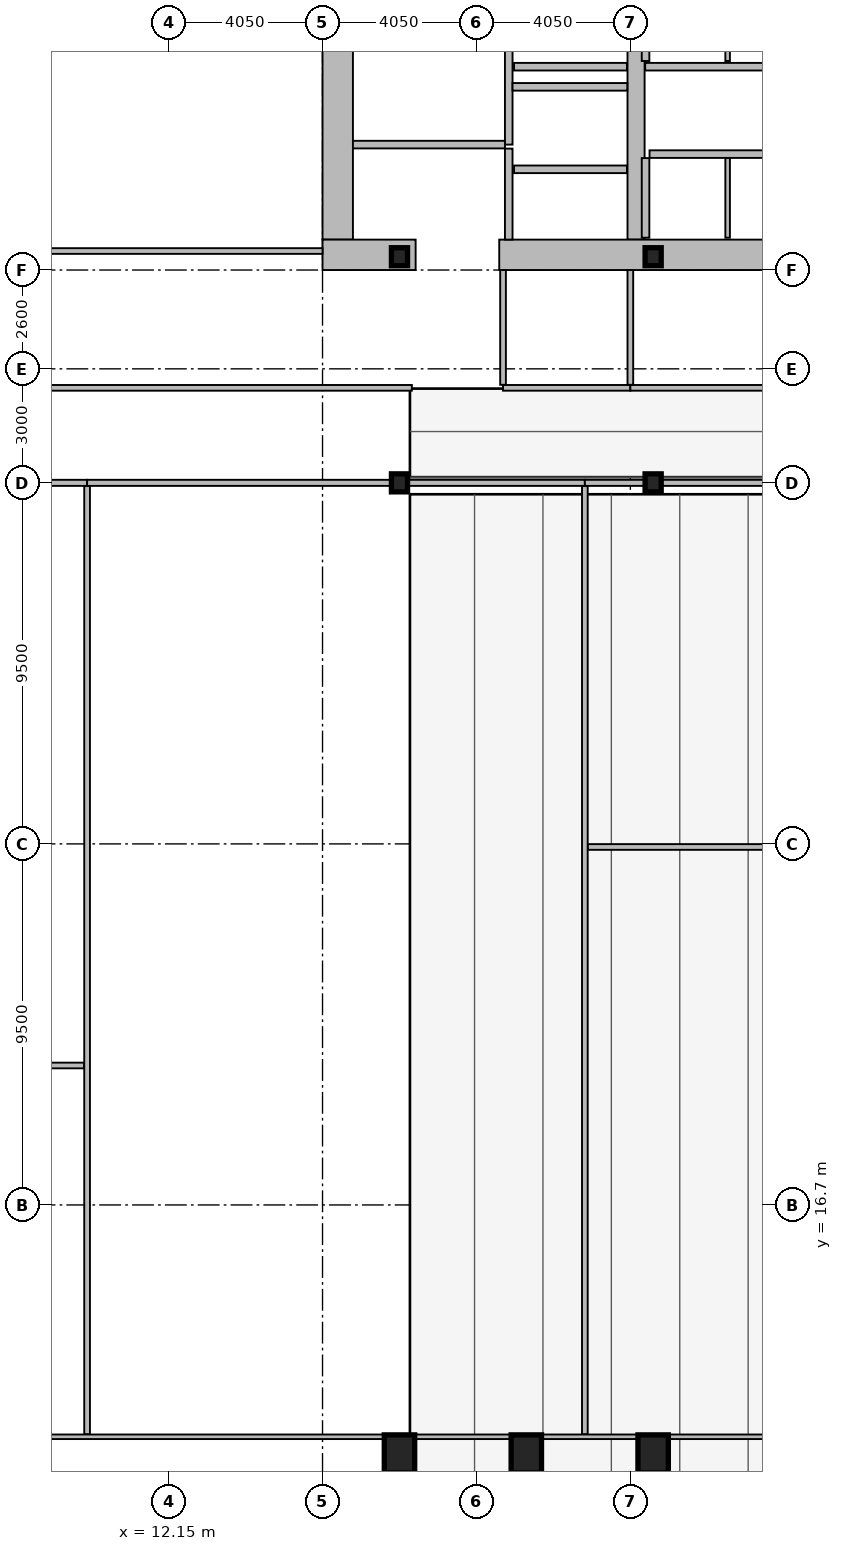
"""IFC4 building model, lengths in metres.
Left out: names, types, materials, properties, quantities, classifications, styles, units other than length and angle.
Written with IfcOpenShell. Run it as: python <this file> out.ifc"""

import sys

from ifc_helpers import new_model, si_unit, direction, frame, frame_2d, origin, origin_2d, place, context, subcontext, project, spatial, rectangle, hollow_rectangle, i_section, extrude, element, fill, save


model = new_model("IFC4")
c1 = context("Model", 3, precision=1e-05, world=origin(), true_north=direction((0.0, 1.0)))
c2 = subcontext(c1, "Body", "Model", "MODEL_VIEW")
j1 = project(units=[si_unit("LENGTHUNIT", "METRE"), si_unit("PLANEANGLEUNIT", "RADIAN")], contexts=[c1])
p1 = place(None, origin())
s1 = spatial("IfcSite", under=j1, at=p1, CompositionType="ELEMENT")
p2 = place(p1, origin())
s2 = spatial("IfcBuilding", under=s1, at=p2, CompositionType="ELEMENT")
p3 = place(p2, frame((0.0, 0.0, 25.8)))
s3 = spatial("IfcBuildingStorey", under=s2, at=p3, CompositionType="ELEMENT", Elevation=25.8)
p4 = place(p3, frame((16.6, 42.1, 0.0), z_axis=(0.0, 0.0, 1.0), x_axis=(0.0, 1.0, 0.0)))
e1 = element("IfcWall", 1, at=p4, inside=s3, PredefinedType="SHEAR", context=c2, shape_type="SweptSolid", body=[
    extrude(rectangle(XDim=10.8, YDim=0.8, at=frame_2d((5.4, 0.0))), origin(), (0.0, 0.0, 1.0), 3.82),
])
p5 = place(p3, frame((24.45, 42.1, 0.0), z_axis=(0.0, 0.0, 1.0), x_axis=(0.0, 1.0, 0.0)))
e2 = element("IfcWall", 2, at=p5, inside=s3, PredefinedType="SHEAR", context=c2, shape_type="SweptSolid", body=[
    extrude(rectangle(XDim=10.8, YDim=0.45, at=frame_2d((5.4, 0.0))), origin(), (0.0, 0.0, 1.0), 3.82),
])
p6 = place(p3, frame((18.65, 41.7, 0.0), z_axis=(0.0, 0.0, 1.0), x_axis=(-1.0, 0.0, 0.0)))
e3 = element("IfcWall", 3, at=p6, inside=s3, PredefinedType="SHEAR", context=c2, shape_type="SweptSolid", body=[
    extrude(rectangle(XDim=2.45, YDim=0.8, at=frame_2d((1.225, 0.0))), origin(), (0.0, 0.0, 1.0), 3.82),
])
p7 = place(p3, frame((32.3, 41.7, 0.0), z_axis=(0.0, 0.0, 1.0), x_axis=(-1.0, 0.0, 0.0)))
e4 = element("IfcWall", 4, at=p7, inside=s3, PredefinedType="SHEAR", context=c2, shape_type="SweptSolid", body=[
    extrude(rectangle(XDim=11.45, YDim=0.8, at=frame_2d((5.725, 0.0))), origin(), (0.0, 0.0, 1.0), 3.82),
])
for number, where, z_axis, x_axis in (
    (5, (18.225, 10.15, 0.0), (0.0, 0.0, 1.0), (1.0, 0.0, 0.0)),
    (6, (21.562, 10.15, 0.0), (0.0, 0.0, 1.0), (1.0, 0.0, 0.0)),
    (7, (24.9, 10.15, 0.0), (0.0, 0.0, 1.0), (1.0, 0.0, 0.0)),
):
    element("IfcColumn", number, at=place(p3, frame(where, z_axis=z_axis, x_axis=x_axis)), inside=s3, PredefinedType="COLUMN", context=c2, shape_type="SweptSolid", body=[
        extrude(hollow_rectangle(XDim=0.8, YDim=1.0, WallThickness=0.055, at=origin_2d()), origin(), (0.0, 0.0, 1.0), 4.0),
    ])
for number, where, z_axis, x_axis in (
    (8, (18.225, 35.7, 0.0), (0.0, 0.0, 1.0), (1.0, 0.0, 0.0)),
    (9, (18.225, 41.65, 0.0), (0.0, 0.0, 1.0), (1.0, 0.0, 0.0)),
    (10, (24.9, 35.7, 0.0), (0.0, 0.0, 1.0), (1.0, 0.0, 0.0)),
    (11, (24.9, 41.65, 0.0), (0.0, 0.0, 1.0), (1.0, 0.0, 0.0)),
):
    element("IfcColumn", number, at=place(p3, frame(where, z_axis=z_axis, x_axis=x_axis)), inside=s3, PredefinedType="COLUMN", context=c2, shape_type="SweptSolid", body=[
        extrude(i_section(OverallWidth=0.424, OverallDepth=0.474, WebThickness=0.048, FlangeThickness=0.077, at=origin_2d()), origin(), (0.0, 0.0, 1.0), 4.0),
    ])
p8 = place(p3, frame((24.21, 43.95, 0.0), z_axis=(0.0, 0.0, 1.0), x_axis=(-1.0, 0.0, 0.0)))
e12 = element("IfcWall", 12, at=p8, inside=s3, PredefinedType="PARTITIONING", context=c2, shape_type="SweptSolid", body=[
    extrude(rectangle(XDim=2.97, YDim=0.2, at=frame_2d((1.485, 0.0))), origin(), (0.0, 0.0, 1.0), 3.82),
])
p9 = place(p8, frame((0.86, 0.0, 0.0)))
e13 = element("IfcOpeningElement", 13, at=p9, cuts=e12, PredefinedType="OPENING", context=c2, shape_type="SweptSolid", body=[
    extrude(rectangle(XDim=1.3, YDim=2.18, at=frame_2d((0.65, 1.09))), frame((0.0, 0.11, 0.0), z_axis=(0.0, -1.0, 0.0), x_axis=(1.0, 0.0, 0.0)), (0.0, 0.0, 1.0), 0.22),
])
p10 = place(p3, frame((24.21, 46.65, 0.0), z_axis=(0.0, 0.0, 1.0), x_axis=(-1.0, 0.0, 0.0)))
e14 = element("IfcWall", 14, at=p10, inside=s3, PredefinedType="PARTITIONING", context=c2, shape_type="SweptSolid", body=[
    extrude(rectangle(XDim=2.97, YDim=0.2, at=frame_2d((1.485, 0.0))), origin(), (0.0, 0.0, 1.0), 3.82),
])
p11 = place(p10, frame((0.91, 0.0, 0.0)))
e15 = element("IfcOpeningElement", 15, at=p11, cuts=e14, PredefinedType="OPENING", context=c2, shape_type="SweptSolid", body=[
    extrude(rectangle(XDim=1.2, YDim=2.18, at=frame_2d((0.6, 1.09))), frame((0.0, 0.11, 0.0), z_axis=(0.0, -1.0, 0.0), x_axis=(1.0, 0.0, 0.0)), (0.0, 0.0, 1.0), 0.22),
])
p12 = place(p3, frame((31.22, 46.65, 0.0), z_axis=(0.0, 0.0, 1.0), x_axis=(-1.0, 0.0, 0.0)))
e16 = element("IfcWall", 16, at=p12, inside=s3, PredefinedType="PARTITIONING", context=c2, shape_type="SweptSolid", body=[
    extrude(rectangle(XDim=6.53, YDim=0.2, at=frame_2d((3.265, 0.0))), origin(), (0.0, 0.0, 1.0), 3.82),
])
p13 = place(p12, frame((4.9, 0.0, 0.0)))
e17 = element("IfcOpeningElement", 17, at=p13, cuts=e16, PredefinedType="OPENING", context=c2, shape_type="SweptSolid", body=[
    extrude(rectangle(XDim=1.1, YDim=2.18, at=frame_2d((0.55, 1.09))), frame((0.0, 0.11, 0.0), z_axis=(0.0, -1.0, 0.0), x_axis=(1.0, 0.0, 0.0)), (0.0, 0.0, 1.0), 0.22),
])
p14 = place(p12, frame((2.74, 0.0, 0.0)))
e18 = element("IfcOpeningElement", 18, at=p14, cuts=e16, PredefinedType="OPENING", context=c2, shape_type="SweptSolid", body=[
    extrude(rectangle(XDim=1.1, YDim=2.18, at=frame_2d((0.55, 1.09))), frame((0.0, 0.11, 0.0), z_axis=(0.0, -1.0, 0.0), x_axis=(1.0, 0.0, 0.0)), (0.0, 0.0, 1.0), 0.22),
])
p15 = place(p12, frame((0.58, 0.0, 0.0)))
e19 = element("IfcOpeningElement", 19, at=p15, cuts=e16, PredefinedType="OPENING", context=c2, shape_type="SweptSolid", body=[
    extrude(rectangle(XDim=1.1, YDim=2.18, at=frame_2d((0.55, 1.09))), frame((0.0, 0.11, 0.0), z_axis=(0.0, -1.0, 0.0), x_axis=(1.0, 0.0, 0.0)), (0.0, 0.0, 1.0), 0.22),
])
p16 = place(p3, frame((21.1, 44.6, 0.0), z_axis=(0.0, 0.0, 1.0), x_axis=(0.0, 1.0, 0.0)))
e20 = element("IfcWall", 20, at=p16, inside=s3, PredefinedType="PARTITIONING", context=c2, shape_type="SweptSolid", body=[
    extrude(rectangle(XDim=4.3, YDim=0.2, at=frame_2d((2.15, 0.0))), origin(), (0.0, 0.0, 1.0), 3.82),
])
p17 = place(p3, frame((17.0, 44.6, 0.0), z_axis=(0.0, 0.0, 1.0), x_axis=(1.0, 0.0, 0.0)))
e21 = element("IfcWall", 21, at=p17, inside=s3, PredefinedType="PARTITIONING", context=c2, shape_type="SweptSolid", body=[
    extrude(rectangle(XDim=4.0, YDim=0.2, at=frame_2d((2.0, 0.0))), origin(), (0.0, 0.0, 1.0), 3.82),
])
p18 = place(p17, frame((1.25, 0.0, 0.0)))
e22 = element("IfcOpeningElement", 22, at=p18, cuts=e21, PredefinedType="OPENING", context=c2, shape_type="SweptSolid", body=[
    extrude(rectangle(XDim=1.05, YDim=2.15, at=frame_2d((0.525, 1.075))), frame((0.0, 0.11, 0.0), z_axis=(0.0, -1.0, 0.0), x_axis=(1.0, 0.0, 0.0)), (0.0, 0.0, 1.0), 0.22),
])
p19 = place(p3, frame((21.2, 46.12, 0.0), z_axis=(0.0, 0.0, 1.0), x_axis=(1.0, 0.0, 0.0)))
e23 = element("IfcWall", 23, at=p19, inside=s3, PredefinedType="PARTITIONING", context=c2, shape_type="SweptSolid", body=[
    extrude(rectangle(XDim=3.02, YDim=0.2, at=frame_2d((1.51, 0.0))), origin(), (0.0, 0.0, 1.0), 3.82),
])
p20 = place(p3, frame((21.1, 42.1, 0.0), z_axis=(0.0, 0.0, 1.0), x_axis=(0.0, 1.0, 0.0)))
e24 = element("IfcWall", 24, at=p20, inside=s3, PredefinedType="PARTITIONING", context=c2, shape_type="SweptSolid", body=[
    extrude(rectangle(XDim=2.395, YDim=0.2, at=frame_2d((1.198, 0.0))), origin(), (0.0, 0.0, 1.0), 3.82),
])
p21 = place(p20, frame((0.38, 0.0, 0.0)))
e25 = element("IfcOpeningElement", 25, at=p21, cuts=e24, PredefinedType="OPENING", context=c2, shape_type="SweptSolid", body=[
    extrude(rectangle(XDim=1.05, YDim=2.15, at=frame_2d((0.525, 1.075))), frame((0.0, 0.11, 0.0), z_axis=(0.0, -1.0, 0.0), x_axis=(1.0, 0.0, 0.0)), (0.0, 0.0, 1.0), 0.22),
])
p22 = place(p3, frame((24.7, 46.8, 0.0), z_axis=(0.0, 0.0, 1.0), x_axis=(0.0, 1.0, 0.0)))
e26 = element("IfcWall", 26, at=p22, inside=s3, PredefinedType="PARTITIONING", context=c2, shape_type="SweptSolid", body=[
    extrude(rectangle(XDim=2.095, YDim=0.2, at=frame_2d((1.047, 0.0))), origin(), (0.0, 0.0, 1.0), 3.82),
])
p23 = place(p3, frame((26.86, 46.8, 0.0), z_axis=(0.0, 0.0, 1.0), x_axis=(0.0, 1.0, 0.0)))
e27 = element("IfcWall", 27, at=p23, inside=s3, PredefinedType="PARTITIONING", context=c2, shape_type="SweptSolid", body=[
    extrude(rectangle(XDim=2.095, YDim=0.12, at=frame_2d((1.047, 0.0))), origin(), (0.0, 0.0, 1.0), 3.82),
])
p24 = place(p3, frame((24.805, 44.35, 0.0), z_axis=(0.0, 0.0, 1.0), x_axis=(1.0, 0.0, 0.0)))
e28 = element("IfcWall", 28, at=p24, inside=s3, PredefinedType="PARTITIONING", context=c2, shape_type="SweptSolid", body=[
    extrude(rectangle(XDim=6.27, YDim=0.2, at=frame_2d((3.135, 0.0))), origin(), (0.0, 0.0, 1.0), 3.82),
])
p25 = place(p3, frame((24.7, 42.15, 0.0), z_axis=(0.0, 0.0, 1.0), x_axis=(0.0, 1.0, 0.0)))
e29 = element("IfcWall", 29, at=p25, inside=s3, PredefinedType="PARTITIONING", context=c2, shape_type="SweptSolid", body=[
    extrude(rectangle(XDim=2.095, YDim=0.2, at=frame_2d((1.048, 0.0))), origin(), (0.0, 0.0, 1.0), 3.82),
])
p26 = place(p3, frame((26.86, 42.15, 0.0), z_axis=(0.0, 0.0, 1.0), x_axis=(0.0, 1.0, 0.0)))
e30 = element("IfcWall", 30, at=p26, inside=s3, PredefinedType="PARTITIONING", context=c2, shape_type="SweptSolid", body=[
    extrude(rectangle(XDim=2.095, YDim=0.12, at=frame_2d((1.048, 0.0))), origin(), (0.0, 0.0, 1.0), 3.82),
])
p27 = place(p3, frame((20.95, 38.2, 0.0), z_axis=(0.0, 0.0, 1.0), x_axis=(1.0, 0.0, 0.0)))
e31 = element("IfcWall", 31, at=p27, inside=s3, PredefinedType="PARTITIONING", context=c2, shape_type="SweptSolid", body=[
    extrude(rectangle(XDim=3.35, YDim=0.15, at=frame_2d((1.675, 0.0))), origin(), (0.0, 0.0, 1.0), 3.82),
])
p28 = place(p27, frame((0.9, 0.0, 0.0)))
e32 = element("IfcOpeningElement", 32, at=p28, cuts=e31, PredefinedType="OPENING", context=c2, shape_type="SweptSolid", body=[
    extrude(rectangle(XDim=0.95, YDim=2.05, at=frame_2d((0.475, 1.025))), frame((0.0, 0.085, 0.0), z_axis=(0.0, -1.0, 0.0), x_axis=(1.0, 0.0, 0.0)), (0.0, 0.0, 1.0), 0.17),
])
p29 = place(p3, frame((24.3, 38.2, 0.0), z_axis=(0.0, 0.0, 1.0), x_axis=(1.0, 0.0, 0.0)))
e33 = element("IfcWall", 33, at=p29, inside=s3, PredefinedType="PARTITIONING", context=c2, shape_type="SweptSolid", body=[
    extrude(rectangle(XDim=4.1, YDim=0.15, at=frame_2d((2.05, 0.0))), origin(), (0.0, 0.0, 1.0), 3.01),
])
p30 = place(p29, frame((0.9, 0.0, 0.0)))
e34 = element("IfcOpeningElement", 34, at=p30, cuts=e33, PredefinedType="OPENING", context=c2, shape_type="SweptSolid", body=[
    extrude(rectangle(XDim=0.95, YDim=2.05, at=frame_2d((0.475, 1.025))), frame((0.0, 0.085, 0.0), z_axis=(0.0, -1.0, 0.0), x_axis=(1.0, 0.0, 0.0)), (0.0, 0.0, 1.0), 0.17),
])
for number, where, z_axis, x_axis in (
    (35, (20.95, 38.28, 0.0), (0.0, 0.0, 1.0), (0.0, 1.0, 0.0)),
    (36, (24.3, 38.28, 0.0), (0.0, 0.0, 1.0), (0.0, 1.0, 0.0)),
):
    element("IfcWall", number, at=place(p3, frame(where, z_axis=z_axis, x_axis=x_axis)), inside=s3, PredefinedType="PARTITIONING", context=c2, shape_type="SweptSolid", body=[
        extrude(rectangle(XDim=3.02, YDim=0.15, at=frame_2d((1.51, 0.0))), origin(), (0.0, 0.0, 1.0), 3.82),
    ])
p31 = place(p3, frame((2.03, 38.2, 0.0), z_axis=(0.0, 0.0, 1.0), x_axis=(1.0, 0.0, 0.0)))
e37 = element("IfcWall", 37, at=p31, inside=s3, PredefinedType="PARTITIONING", context=c2, shape_type="SweptSolid", body=[
    extrude(rectangle(XDim=16.52, YDim=0.15, at=frame_2d((8.26, 0.0))), origin(), (0.0, 0.0, 1.0), 3.01),
])
p32 = place(p31, frame((12.32, 0.0, 0.0)))
e38 = element("IfcOpeningElement", 38, at=p32, cuts=e37, PredefinedType="OPENING", context=c2, shape_type="SweptSolid", body=[
    extrude(rectangle(XDim=0.95, YDim=2.05, at=frame_2d((0.475, 1.025))), frame((0.0, 0.085, 0.0), z_axis=(0.0, -1.0, 0.0), x_axis=(1.0, 0.0, 0.0)), (0.0, 0.0, 1.0), 0.17),
])
p33 = place(p3, frame((2.095, 41.8, 0.0), z_axis=(0.0, 0.0, 1.0), x_axis=(1.0, 0.0, 0.0)))
e39 = element("IfcWall", 39, at=p33, inside=s3, PredefinedType="PARTITIONING", context=c2, shape_type="SweptSolid", body=[
    extrude(rectangle(XDim=14.105, YDim=0.15, at=frame_2d((7.052, 0.0))), origin(), (0.0, 0.0, 1.0), 3.82),
])
p34 = place(p33, frame((12.32, 0.0, 0.0)))
e40 = element("IfcOpeningElement", 40, at=p34, cuts=e39, PredefinedType="OPENING", context=c2, shape_type="SweptSolid", body=[
    extrude(rectangle(XDim=0.9, YDim=2.05, at=frame_2d((0.45, 1.025))), frame((0.0, 0.085, 0.0), z_axis=(0.0, -1.0, 0.0), x_axis=(1.0, 0.0, 0.0)), (0.0, 0.0, 1.0), 0.17),
])
p35 = place(p3, frame((2.03, 35.7, 0.0), z_axis=(0.0, 0.0, 1.0), x_axis=(1.0, 0.0, 0.0)))
e41 = element("IfcWall", 41, at=p35, inside=s3, PredefinedType="PARTITIONING", context=c2, shape_type="SweptSolid", body=[
    extrude(rectangle(XDim=7.975, YDim=0.16, at=frame_2d((3.987, 0.0))), origin(), (0.0, 0.0, 1.0), 3.01),
])
p36 = place(p35, frame((3.35, 0.0, 0.0)))
e42 = element("IfcOpeningElement", 42, at=p36, cuts=e41, PredefinedType="OPENING", context=c2, shape_type="SweptSolid", body=[
    extrude(rectangle(XDim=1.0, YDim=2.05, at=frame_2d((0.5, 1.025))), frame((0.0, 0.09, 0.0), z_axis=(0.0, -1.0, 0.0), x_axis=(1.0, 0.0, 0.0)), (0.0, 0.0, 1.0), 0.18),
])
p37 = place(p3, frame((2.095, 20.369, 0.0), z_axis=(0.0, 0.0, 1.0), x_axis=(1.0, 0.0, 0.0)))
e43 = element("IfcWall", 43, at=p37, inside=s3, PredefinedType="PARTITIONING", context=c2, shape_type="SweptSolid", body=[
    extrude(rectangle(XDim=7.83, YDim=0.15, at=frame_2d((3.915, 0.0))), origin(), (0.0, 0.0, 1.0), 3.82),
])
p38 = place(p37, frame((3.589, 0.0, 0.0)))
e44 = element("IfcOpeningElement", 44, at=p38, cuts=e43, PredefinedType="OPENING", context=c2, shape_type="SweptSolid", body=[
    extrude(rectangle(XDim=0.9, YDim=2.05, at=frame_2d((0.45, 1.025))), frame((0.0, 0.085, 0.0), z_axis=(0.0, -1.0, 0.0), x_axis=(1.0, 0.0, 0.0)), (0.0, 0.0, 1.0), 0.17),
])
p39 = place(p3, frame((10.005, 35.7, 0.0), z_axis=(0.0, 0.0, 1.0), x_axis=(1.0, 0.0, 0.0)))
e45 = element("IfcWall", 45, at=p39, inside=s3, PredefinedType="PARTITIONING", context=c2, shape_type="SweptSolid", body=[
    extrude(rectangle(XDim=13.098, YDim=0.16, at=frame_2d((6.549, 0.0))), origin(), (0.0, 0.0, 1.0), 3.01),
])
p40 = place(p39, frame((5.501, 0.0, 0.0)))
e46 = element("IfcOpeningElement", 46, at=p40, cuts=e45, PredefinedType="OPENING", context=c2, shape_type="SweptSolid", body=[
    extrude(rectangle(XDim=1.0, YDim=2.05, at=frame_2d((0.5, 1.025))), frame((0.0, 0.09, 0.0), z_axis=(0.0, -1.0, 0.0), x_axis=(1.0, 0.0, 0.0)), (0.0, 0.0, 1.0), 0.18),
])
p41 = place(p3, frame((10.005, 10.665, 0.0), z_axis=(0.0, 0.0, 1.0), x_axis=(0.0, 1.0, 0.0)))
e47 = element("IfcWall", 47, at=p41, inside=s3, PredefinedType="PARTITIONING", context=c2, shape_type="SweptSolid", body=[
    extrude(rectangle(XDim=24.95, YDim=0.15, at=frame_2d((12.475, 0.0))), origin(), (0.0, 0.0, 1.0), 3.01),
])
p42 = place(p3, frame((23.103, 35.7, 0.0), z_axis=(0.0, 0.0, 1.0), x_axis=(1.0, 0.0, 0.0)))
e48 = element("IfcWall", 48, at=p42, inside=s3, PredefinedType="PARTITIONING", context=c2, shape_type="SweptSolid", body=[
    extrude(rectangle(XDim=19.384, YDim=0.16, at=frame_2d((9.692, 0.0))), origin(), (0.0, 0.0, 1.0), 3.01),
])
p43 = place(p42, frame((8.141, 0.0, 0.0)))
e49 = element("IfcOpeningElement", 49, at=p43, cuts=e48, PredefinedType="OPENING", context=c2, shape_type="SweptSolid", body=[
    extrude(rectangle(XDim=1.6, YDim=2.15, at=frame_2d((0.8, 1.075))), frame((0.0, 0.09, 0.0), z_axis=(0.0, -1.0, 0.0), x_axis=(1.0, 0.0, 0.0)), (0.0, 0.0, 1.0), 0.18),
])
p44 = place(p3, frame((23.103, 10.665, 0.0), z_axis=(0.0, 0.0, 1.0), x_axis=(0.0, 1.0, 0.0)))
e50 = element("IfcWall", 50, at=p44, inside=s3, PredefinedType="PARTITIONING", context=c2, shape_type="SweptSolid", body=[
    extrude(rectangle(XDim=24.95, YDim=0.15, at=frame_2d((12.475, 0.0))), origin(), (0.0, 0.0, 1.0), 3.21),
])
p45 = place(p3, frame((23.183, 26.119, 0.0), z_axis=(0.0, 0.0, 1.0), x_axis=(1.0, 0.0, 0.0)))
e51 = element("IfcWall", 51, at=p45, inside=s3, PredefinedType="PARTITIONING", context=c2, shape_type="SweptSolid", body=[
    extrude(rectangle(XDim=19.224, YDim=0.15, at=frame_2d((9.612, 0.0))), origin(), (0.0, 0.0, 1.0), 3.01),
])
p46 = place(p45, frame((8.723, 0.0, 0.0)))
e52 = element("IfcOpeningElement", 52, at=p46, cuts=e51, PredefinedType="OPENING", context=c2, shape_type="SweptSolid", body=[
    extrude(rectangle(XDim=0.9, YDim=2.05, at=frame_2d((0.45, 1.025))), frame((0.0, 0.085, 0.0), z_axis=(0.0, -1.0, 0.0), x_axis=(1.0, 0.0, 0.0)), (0.0, 0.0, 1.0), 0.17),
])
p47 = place(p3, frame((2.095, 10.6, 0.0), z_axis=(0.0, 0.0, 1.0), x_axis=(1.0, 0.0, 0.0)))
e53 = element("IfcWall", 53, at=p47, inside=s3, PredefinedType="PARTITIONING", context=c2, shape_type="SweptSolid", body=[
    extrude(rectangle(XDim=68.71, YDim=0.12, at=frame_2d((34.355, 0.0))), origin(), (0.0, 0.0, 1.0), 3.01),
])
p48 = place(p9, origin())
e54 = element("IfcDoor", 54, at=p48, inside=s3, OperationType="SLIDING_TO_LEFT", PredefinedType="DOOR", context=c2, shape_type="SweptSolid", body=[
    extrude(rectangle(XDim=1.3, YDim=2.18, at=frame_2d((0.65, 1.09))), frame((0.0, 0.025, 0.0), z_axis=(0.0, -1.0, 0.0), x_axis=(1.0, 0.0, 0.0)), (0.0, 0.0, 1.0), 0.05),
])
fill(e13, e54)
p49 = place(p11, origin())
e55 = element("IfcDoor", 55, at=p49, inside=s3, OperationType="SLIDING_TO_LEFT", PredefinedType="DOOR", context=c2, shape_type="SweptSolid", body=[
    extrude(rectangle(XDim=1.2, YDim=2.18, at=frame_2d((0.6, 1.09))), frame((0.0, 0.025, 0.0), z_axis=(0.0, -1.0, 0.0), x_axis=(1.0, 0.0, 0.0)), (0.0, 0.0, 1.0), 0.05),
])
fill(e15, e55)
p50 = place(p13, origin())
e56 = element("IfcDoor", 56, at=p50, inside=s3, OperationType="SLIDING_TO_LEFT", PredefinedType="DOOR", context=c2, shape_type="SweptSolid", body=[
    extrude(rectangle(XDim=1.1, YDim=2.18, at=frame_2d((0.55, 1.09))), frame((0.0, 0.025, 0.0), z_axis=(0.0, -1.0, 0.0), x_axis=(1.0, 0.0, 0.0)), (0.0, 0.0, 1.0), 0.05),
])
fill(e17, e56)
p51 = place(p14, origin())
e57 = element("IfcDoor", 57, at=p51, inside=s3, OperationType="SLIDING_TO_LEFT", PredefinedType="DOOR", context=c2, shape_type="SweptSolid", body=[
    extrude(rectangle(XDim=1.1, YDim=2.18, at=frame_2d((0.55, 1.09))), frame((0.0, 0.025, 0.0), z_axis=(0.0, -1.0, 0.0), x_axis=(1.0, 0.0, 0.0)), (0.0, 0.0, 1.0), 0.05),
])
fill(e18, e57)
p52 = place(p18, origin())
e58 = element("IfcDoor", 58, at=p52, inside=s3, OperationType="SINGLE_SWING_RIGHT", PredefinedType="DOOR", context=c2, shape_type="SweptSolid", body=[
    extrude(rectangle(XDim=1.05, YDim=2.15, at=frame_2d((0.525, 1.075))), frame((0.0, 0.025, 0.0), z_axis=(0.0, -1.0, 0.0), x_axis=(1.0, 0.0, 0.0)), (0.0, 0.0, 1.0), 0.05),
])
fill(e22, e58)
p53 = place(p21, origin())
e59 = element("IfcDoor", 59, at=p53, inside=s3, OperationType="SINGLE_SWING_LEFT", PredefinedType="DOOR", context=c2, shape_type="SweptSolid", body=[
    extrude(rectangle(XDim=1.05, YDim=2.15, at=frame_2d((0.525, 1.075))), frame((0.0, 0.025, 0.0), z_axis=(0.0, -1.0, 0.0), x_axis=(1.0, 0.0, 0.0)), (0.0, 0.0, 1.0), 0.05),
])
fill(e25, e59)
p54 = place(p28, origin())
e60 = element("IfcDoor", 60, at=p54, inside=s3, OperationType="SINGLE_SWING_LEFT", PredefinedType="DOOR", context=c2, shape_type="SweptSolid", body=[
    extrude(rectangle(XDim=0.95, YDim=2.05, at=frame_2d((0.475, 1.025))), frame((0.0, 0.025, 0.0), z_axis=(0.0, -1.0, 0.0), x_axis=(1.0, 0.0, 0.0)), (0.0, 0.0, 1.0), 0.05),
])
fill(e32, e60)
p55 = place(p30, origin())
e61 = element("IfcDoor", 61, at=p55, inside=s3, OperationType="SINGLE_SWING_RIGHT", PredefinedType="DOOR", context=c2, shape_type="SweptSolid", body=[
    extrude(rectangle(XDim=0.95, YDim=2.05, at=frame_2d((0.475, 1.025))), frame((0.0, 0.025, 0.0), z_axis=(0.0, -1.0, 0.0), x_axis=(1.0, 0.0, 0.0)), (0.0, 0.0, 1.0), 0.05),
])
fill(e34, e61)
p56 = place(p32, origin())
e62 = element("IfcDoor", 62, at=p56, inside=s3, OperationType="SINGLE_SWING_RIGHT", PredefinedType="DOOR", context=c2, shape_type="SweptSolid", body=[
    extrude(rectangle(XDim=0.95, YDim=2.05, at=frame_2d((0.475, 1.025))), frame((0.0, 0.025, 0.0), z_axis=(0.0, -1.0, 0.0), x_axis=(1.0, 0.0, 0.0)), (0.0, 0.0, 1.0), 0.05),
])
fill(e38, e62)
p57 = place(p34, origin())
e63 = element("IfcDoor", 63, at=p57, inside=s3, OperationType="SINGLE_SWING_RIGHT", PredefinedType="DOOR", context=c2, shape_type="SweptSolid", body=[
    extrude(rectangle(XDim=0.9, YDim=2.05, at=frame_2d((0.45, 1.025))), frame((0.0, 0.025, 0.0), z_axis=(0.0, -1.0, 0.0), x_axis=(1.0, 0.0, 0.0)), (0.0, 0.0, 1.0), 0.05),
])
fill(e40, e63)
p58 = place(p40, origin())
e64 = element("IfcDoor", 64, at=p58, inside=s3, OperationType="SINGLE_SWING_RIGHT", PredefinedType="DOOR", context=c2, shape_type="SweptSolid", body=[
    extrude(rectangle(XDim=1.0, YDim=2.05, at=frame_2d((0.5, 1.025))), frame((0.0, 0.025, 0.0), z_axis=(0.0, -1.0, 0.0), x_axis=(1.0, 0.0, 0.0)), (0.0, 0.0, 1.0), 0.05),
])
fill(e46, e64)
save(model, sys.argv[1])
